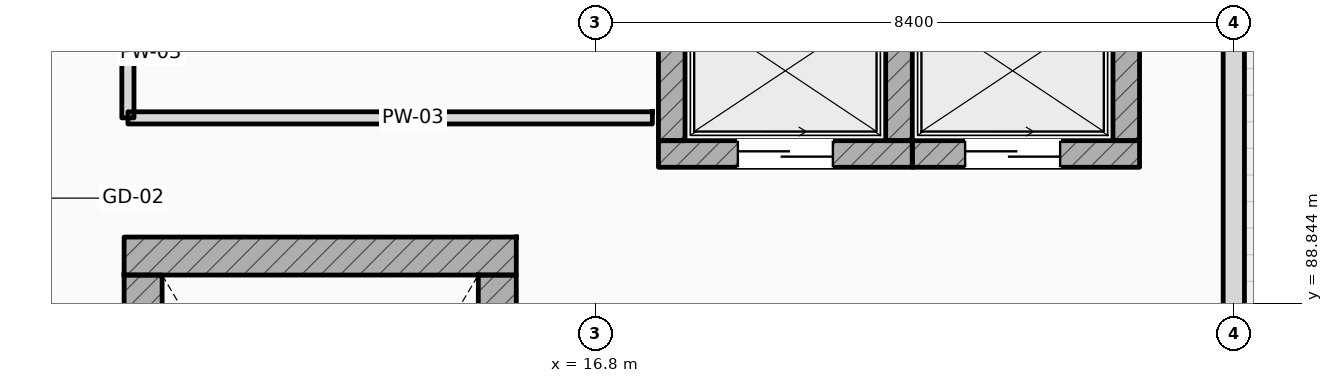
"""IFC4 building model, lengths in metres.
Left out: names, types, materials, properties, quantities, classifications, styles, units other than length and angle.
Written with IfcOpenShell. Run it as: python <this file> out.ifc"""

import sys

from ifc_helpers import new_model, si_unit, direction, frame, frame_2d, origin, place, context, subcontext, project, spatial, rectangle, extrude, element, fill, save


model = new_model("IFC4")
c1 = context("Model", 3, precision=1e-05, world=origin(), true_north=direction((0.0, 1.0)))
c2 = subcontext(c1, "Body", "Model", "MODEL_VIEW")
j1 = project(units=[si_unit("LENGTHUNIT", "METRE"), si_unit("PLANEANGLEUNIT", "RADIAN")], contexts=[c1])
p1 = place(None, origin())
s1 = spatial("IfcSite", under=j1, at=p1, CompositionType="ELEMENT")
p2 = place(p1, origin())
s2 = spatial("IfcBuilding", under=s1, at=p2, CompositionType="ELEMENT")
p3 = place(p2, frame((0.0, 0.0, 16.2)))
s3 = spatial("IfcBuildingStorey", under=s2, at=p3, CompositionType="ELEMENT", Elevation=16.2)
p4 = place(p3, frame((10.6, 89.462, 0.0), z_axis=(0.0, 0.0, 1.0), x_axis=(1.0, 0.0, 0.0)))
e1 = element("IfcWall", 1, at=p4, inside=s3, PredefinedType="SHEAR", context=c2, shape_type="SweptSolid", body=[
    extrude(rectangle(XDim=5.16, YDim=0.5, at=frame_2d((2.58, 0.0))), origin(), (0.0, 0.0, 1.0), 4.2),
])
p5 = place(p3, frame((10.85, 80.1, 0.0), z_axis=(0.0, 0.0, 1.0), x_axis=(0.0, 1.0, 0.0)))
e2 = element("IfcWall", 2, at=p5, inside=s3, PredefinedType="SHEAR", context=c2, shape_type="SweptSolid", body=[
    extrude(rectangle(XDim=9.112, YDim=0.5, at=frame_2d((4.556, 0.0))), origin(), (0.0, 0.0, 1.0), 4.2),
])
p6 = place(p3, frame((15.51, 80.1, 0.0), z_axis=(0.0, 0.0, 1.0), x_axis=(0.0, 1.0, 0.0)))
e3 = element("IfcWall", 3, at=p6, inside=s3, PredefinedType="SHEAR", context=c2, shape_type="SweptSolid", body=[
    extrude(rectangle(XDim=9.112, YDim=0.5, at=frame_2d((4.556, 0.0))), origin(), (0.0, 0.0, 1.0), 4.2),
])
p7 = place(p6, frame((0.44, 0.0, 0.0)))
e4 = element("IfcOpeningElement", 4, at=p7, cuts=e3, PredefinedType="OPENING", context=c2, shape_type="SweptSolid", body=[
    extrude(rectangle(XDim=1.1, YDim=2.2, at=frame_2d((0.55, 1.1))), frame((0.0, 0.26, 0.0), z_axis=(0.0, -1.0, 0.0), x_axis=(1.0, 0.0, 0.0)), (0.0, 0.0, 1.0), 0.52),
])
p8 = place(p3, frame((25.2, 79.5, 0.0), z_axis=(0.0, 0.0, 1.0), x_axis=(0.0, 1.0, 0.0)))
e5 = element("IfcWall", 5, at=p8, inside=s3, PredefinedType="STANDARD", context=c2, shape_type="SweptSolid", body=[
    extrude(rectangle(XDim=16.5, YDim=0.28, at=frame_2d((8.25, 0.0))), origin(), (0.0, 0.0, 1.0), 3.51),
])
p9 = place(p3, frame((17.63, 90.805, 0.0), z_axis=(0.0, 0.0, 1.0), x_axis=(1.0, 0.0, 0.0)))
e6 = element("IfcWall", 6, at=p9, inside=s3, PredefinedType="SHEAR", context=c2, shape_type="SweptSolid", body=[
    extrude(rectangle(XDim=3.34, YDim=0.35, at=frame_2d((1.67, 0.0))), origin(), (0.0, 0.0, 1.0), 3.92),
])
p10 = place(p9, frame((1.045, 0.0, 0.0)))
e7 = element("IfcOpeningElement", 7, at=p10, cuts=e6, PredefinedType="OPENING", context=c2, shape_type="SweptSolid", body=[
    extrude(rectangle(XDim=1.25, YDim=2.25, at=frame_2d((0.625, 1.125))), frame((0.0, 0.185, 0.0), z_axis=(0.0, -1.0, 0.0), x_axis=(1.0, 0.0, 0.0)), (0.0, 0.0, 1.0), 0.37),
])
for number, where, z_axis, x_axis in (
    (8, (17.805, 90.98, 0.0), (0.0, 0.0, 1.0), (0.0, 1.0, 0.0)),
    (9, (20.795, 90.98, 0.0), (0.0, 0.0, 1.0), (0.0, 1.0, 0.0)),
):
    element("IfcWall", number, at=place(p3, frame(where, z_axis=z_axis, x_axis=x_axis)), inside=s3, PredefinedType="SHEAR", context=c2, shape_type="SweptSolid", body=[
        extrude(rectangle(XDim=1.84, YDim=0.35, at=frame_2d((0.92, 0.0))), origin(), (0.0, 0.0, 1.0), 3.92),
    ])
p11 = place(p3, frame((20.97, 90.805, 0.0), z_axis=(0.0, 0.0, 1.0), x_axis=(1.0, 0.0, 0.0)))
e10 = element("IfcWall", 10, at=p11, inside=s3, PredefinedType="SHEAR", context=c2, shape_type="SweptSolid", body=[
    extrude(rectangle(XDim=2.99, YDim=0.35, at=frame_2d((1.495, 0.0))), origin(), (0.0, 0.0, 1.0), 3.92),
])
p12 = place(p11, frame((0.695, 0.0, 0.0)))
e11 = element("IfcOpeningElement", 11, at=p12, cuts=e10, PredefinedType="OPENING", context=c2, shape_type="SweptSolid", body=[
    extrude(rectangle(XDim=1.25, YDim=2.25, at=frame_2d((0.625, 1.125))), frame((0.0, 0.185, 0.0), z_axis=(0.0, -1.0, 0.0), x_axis=(1.0, 0.0, 0.0)), (0.0, 0.0, 1.0), 0.37),
])
p13 = place(p3, frame((23.785, 90.98, 0.0), z_axis=(0.0, 0.0, 1.0), x_axis=(0.0, 1.0, 0.0)))
e12 = element("IfcWall", 12, at=p13, inside=s3, PredefinedType="SHEAR", context=c2, shape_type="SweptSolid", body=[
    extrude(rectangle(XDim=1.84, YDim=0.35, at=frame_2d((0.92, 0.0))), origin(), (0.0, 0.0, 1.0), 3.92),
])
p14 = place(p3, frame((10.65, 91.28, 0.0), z_axis=(0.0, 0.0, 1.0), x_axis=(0.0, 1.0, 0.0)))
e13 = element("IfcWall", 13, at=p14, inside=s3, PredefinedType="PARTITIONING", context=c2, shape_type="SweptSolid", body=[
    extrude(rectangle(XDim=4.58, YDim=0.16, at=frame_2d((2.29, 0.0))), origin(), (0.0, 0.0, 1.0), 3.92),
])
p15 = place(p14, frame((2.0, 0.0, 0.0)))
e14 = element("IfcOpeningElement", 14, at=p15, cuts=e13, PredefinedType="OPENING", context=c2, shape_type="SweptSolid", body=[
    extrude(rectangle(XDim=0.9, YDim=2.1, at=frame_2d((0.45, 1.05))), frame((0.0, 0.09, 0.0), z_axis=(0.0, -1.0, 0.0), x_axis=(1.0, 0.0, 0.0)), (0.0, 0.0, 1.0), 0.18),
])
p16 = place(p3, frame((10.65, 91.28, 0.0), z_axis=(0.0, 0.0, 1.0), x_axis=(1.0, 0.0, 0.0)))
e15 = element("IfcWall", 15, at=p16, inside=s3, PredefinedType="PARTITIONING", context=c2, shape_type="SweptSolid", body=[
    extrude(rectangle(XDim=6.9, YDim=0.16, at=frame_2d((3.45, 0.0))), origin(), (0.0, 0.0, 1.0), 3.92),
])
p17 = place(p10, origin())
e16 = element("IfcDoor", 16, at=p17, inside=s3, OperationType="SLIDING_TO_LEFT", PredefinedType="DOOR", context=c2, shape_type="SweptSolid", body=[
    extrude(rectangle(XDim=1.25, YDim=2.25, at=frame_2d((0.625, 1.125))), frame((0.0, 0.025, 0.0), z_axis=(0.0, -1.0, 0.0), x_axis=(1.0, 0.0, 0.0)), (0.0, 0.0, 1.0), 0.05),
])
fill(e7, e16)
p18 = place(p12, origin())
e17 = element("IfcDoor", 17, at=p18, inside=s3, OperationType="SLIDING_TO_LEFT", PredefinedType="DOOR", context=c2, shape_type="SweptSolid", body=[
    extrude(rectangle(XDim=1.25, YDim=2.25, at=frame_2d((0.625, 1.125))), frame((0.0, 0.025, 0.0), z_axis=(0.0, -1.0, 0.0), x_axis=(1.0, 0.0, 0.0)), (0.0, 0.0, 1.0), 0.05),
])
fill(e11, e17)
save(model, sys.argv[1])
